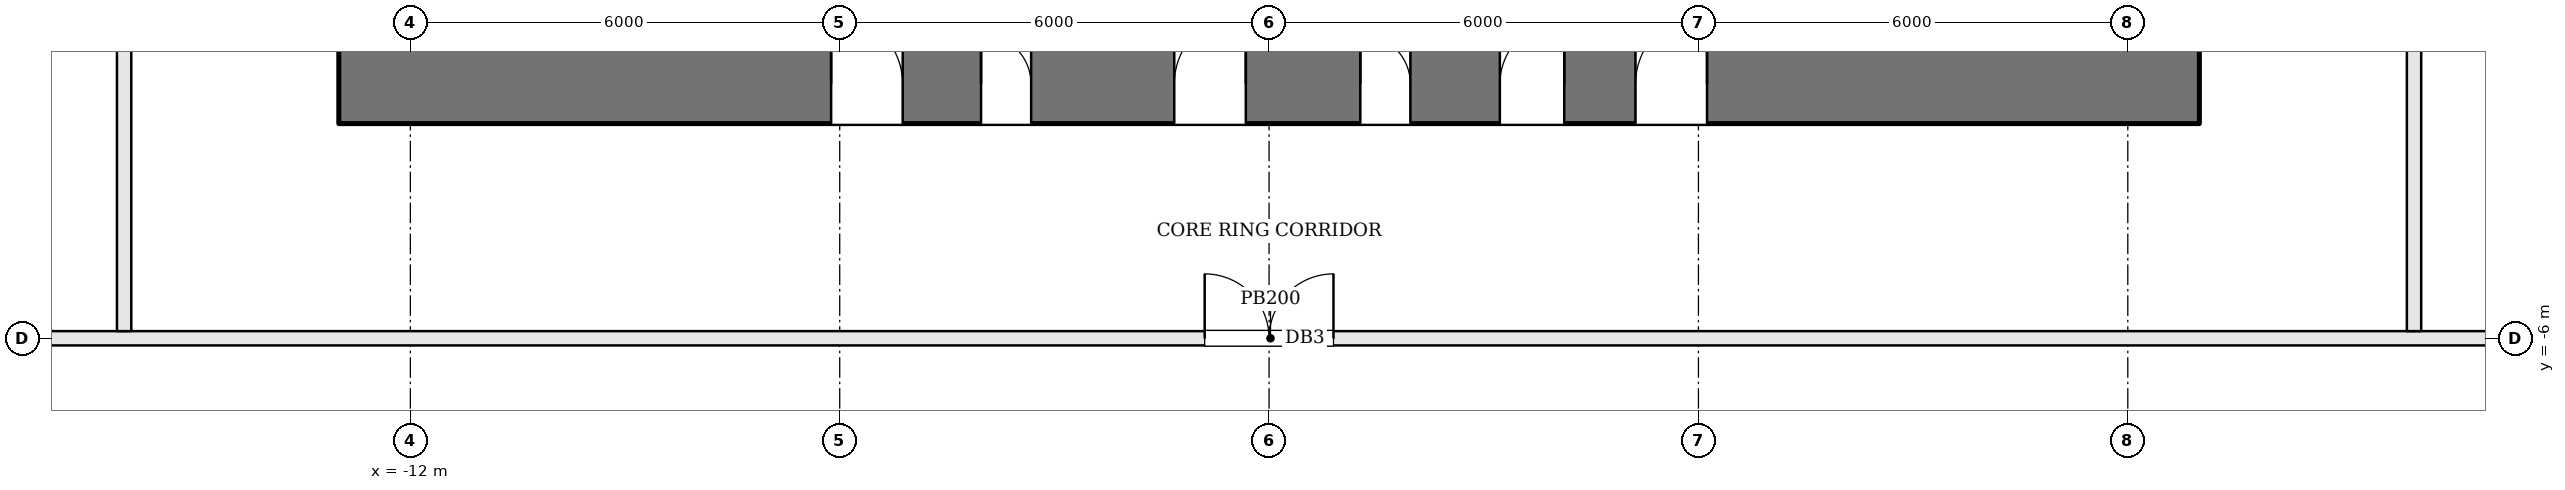
"""IFC4 building model, lengths in metres.
Left out: names, types, materials, properties, quantities, classifications, styles, units other than length and angle.
Written with IfcOpenShell. Run it as: python <this file> out.ifc"""

import sys

from ifc_helpers import new_model, si_unit, direction, frame, frame_2d, origin, place, context, subcontext, project, spatial, rectangle, extrude, element, fill, save


model = new_model("IFC4")
c1 = context("Model", 3, precision=1e-05, world=origin(), true_north=direction((0.0, 1.0)))
c2 = subcontext(c1, "Body", "Model", "MODEL_VIEW")
j1 = project(units=[si_unit("LENGTHUNIT", "METRE"), si_unit("PLANEANGLEUNIT", "RADIAN")], contexts=[c1])
p1 = place(None, origin())
s1 = spatial("IfcSite", under=j1, at=p1, CompositionType="ELEMENT")
p2 = place(p1, origin())
s2 = spatial("IfcBuilding", under=s1, at=p2, CompositionType="ELEMENT")
p3 = place(p2, frame((0.0, 0.0, 106.8)))
s3 = spatial("IfcBuildingStorey", under=s2, at=p3, CompositionType="ELEMENT", Elevation=106.8)
p4 = place(p3, frame((-13.0, -2.45, 0.0), z_axis=(0.0, 0.0, 1.0), x_axis=(1.0, 0.0, 0.0)))
e1 = element("IfcWall", 1, at=p4, inside=s3, PredefinedType="SHEAR", context=c2, shape_type="SweptSolid", body=[
    extrude(rectangle(XDim=26.0, YDim=1.1, at=frame_2d((13.0, 0.0))), origin(), (0.0, 0.0, 1.0), 3.6),
])
p5 = place(p4, frame((8.975, 0.0, 0.0)))
e2 = element("IfcOpeningElement", 2, at=p5, cuts=e1, PredefinedType="OPENING", context=c2, shape_type="SweptSolid", body=[
    extrude(rectangle(XDim=0.7, YDim=2.1, at=frame_2d((0.35, 1.05))), frame((0.0, 0.56, 0.0), z_axis=(0.0, -1.0, 0.0), x_axis=(1.0, 0.0, 0.0)), (0.0, 0.0, 1.0), 1.12),
])
p6 = place(p4, frame((11.675, 0.0, 0.0)))
e3 = element("IfcOpeningElement", 3, at=p6, cuts=e1, PredefinedType="OPENING", context=c2, shape_type="SweptSolid", body=[
    extrude(rectangle(XDim=1.0, YDim=2.1, at=frame_2d((0.5, 1.05))), frame((0.0, 0.56, 0.0), z_axis=(0.0, -1.0, 0.0), x_axis=(1.0, 0.0, 0.0)), (0.0, 0.0, 1.0), 1.12),
])
p7 = place(p4, frame((14.275, 0.0, 0.0)))
e4 = element("IfcOpeningElement", 4, at=p7, cuts=e1, PredefinedType="OPENING", context=c2, shape_type="SweptSolid", body=[
    extrude(rectangle(XDim=0.7, YDim=2.1, at=frame_2d((0.35, 1.05))), frame((0.0, 0.56, 0.0), z_axis=(0.0, -1.0, 0.0), x_axis=(1.0, 0.0, 0.0)), (0.0, 0.0, 1.0), 1.12),
])
p8 = place(p4, frame((16.225, 0.0, 0.0)))
e5 = element("IfcOpeningElement", 5, at=p8, cuts=e1, PredefinedType="OPENING", context=c2, shape_type="SweptSolid", body=[
    extrude(rectangle(XDim=0.9, YDim=2.1, at=frame_2d((0.45, 1.05))), frame((0.0, 0.56, 0.0), z_axis=(0.0, -1.0, 0.0), x_axis=(1.0, 0.0, 0.0)), (0.0, 0.0, 1.0), 1.12),
])
p9 = place(p4, frame((6.88, 0.0, 0.0)))
e6 = element("IfcOpeningElement", 6, at=p9, cuts=e1, PredefinedType="OPENING", context=c2, shape_type="SweptSolid", body=[
    extrude(rectangle(XDim=1.0, YDim=2.1, at=frame_2d((0.5, 1.05))), frame((0.0, 0.56, 0.0), z_axis=(0.0, -1.0, 0.0), x_axis=(1.0, 0.0, 0.0)), (0.0, 0.0, 1.0), 1.12),
])
p10 = place(p4, frame((18.12, 0.0, 0.0)))
e7 = element("IfcOpeningElement", 7, at=p10, cuts=e1, PredefinedType="OPENING", context=c2, shape_type="SweptSolid", body=[
    extrude(rectangle(XDim=1.0, YDim=2.1, at=frame_2d((0.5, 1.05))), frame((0.0, 0.56, 0.0), z_axis=(0.0, -1.0, 0.0), x_axis=(1.0, 0.0, 0.0)), (0.0, 0.0, 1.0), 1.12),
])
p11 = place(p3, frame((-21.998, -6.0, 0.0), z_axis=(0.0, 0.0, 1.0), x_axis=(1.0, 0.0, 0.0)))
e8 = element("IfcWall", 8, at=p11, inside=s3, PredefinedType="PARTITIONING", context=c2, shape_type="SweptSolid", body=[
    extrude(rectangle(XDim=44.036, YDim=0.2, at=frame_2d((22.018, 0.0))), origin(), (0.0, 0.0, 1.0), 3.4),
])
p12 = place(p11, frame((21.098, 0.0, 0.0)))
e9 = element("IfcOpeningElement", 9, at=p12, cuts=e8, PredefinedType="OPENING", context=c2, shape_type="SweptSolid", body=[
    extrude(rectangle(XDim=1.8, YDim=2.1, at=frame_2d((0.9, 1.05))), frame((0.0, 0.11, 0.0), z_axis=(0.0, -1.0, 0.0), x_axis=(1.0, 0.0, 0.0)), (0.0, 0.0, 1.0), 0.22),
])
p13 = place(p3, frame((-16.0, 13.047, 0.0), z_axis=(0.0, 0.0, 1.0), x_axis=(0.0, -1.0, 0.0)))
e10 = element("IfcWall", 10, at=p13, inside=s3, PredefinedType="PARTITIONING", context=c2, shape_type="SweptSolid", body=[
    extrude(rectangle(XDim=18.947, YDim=0.2, at=frame_2d((9.474, 0.0))), origin(), (0.0, 0.0, 1.0), 3.4),
])
p14 = place(p13, frame((7.647, 0.0, 0.0)))
e11 = element("IfcOpeningElement", 11, at=p14, cuts=e10, PredefinedType="OPENING", context=c2, shape_type="SweptSolid", body=[
    extrude(rectangle(XDim=1.8, YDim=2.1, at=frame_2d((0.9, 1.05))), frame((0.0, 0.11, 0.0), z_axis=(0.0, -1.0, 0.0), x_axis=(1.0, 0.0, 0.0)), (0.0, 0.0, 1.0), 0.22),
])
p15 = place(p3, frame((16.0, -5.9, 0.0), z_axis=(0.0, 0.0, 1.0), x_axis=(0.0, 1.0, 0.0)))
e12 = element("IfcWall", 12, at=p15, inside=s3, PredefinedType="PARTITIONING", context=c2, shape_type="SweptSolid", body=[
    extrude(rectangle(XDim=18.952, YDim=0.2, at=frame_2d((9.476, 0.0))), origin(), (0.0, 0.0, 1.0), 3.4),
])
p16 = place(p15, frame((9.5, 0.0, 0.0)))
e13 = element("IfcOpeningElement", 13, at=p16, cuts=e12, PredefinedType="OPENING", context=c2, shape_type="SweptSolid", body=[
    extrude(rectangle(XDim=1.8, YDim=2.1, at=frame_2d((0.9, 1.05))), frame((0.0, 0.11, 0.0), z_axis=(0.0, -1.0, 0.0), x_axis=(1.0, 0.0, 0.0)), (0.0, 0.0, 1.0), 0.22),
])
p17 = place(p5, origin())
e14 = element("IfcDoor", 14, at=p17, inside=s3, OperationType="SINGLE_SWING_LEFT", PredefinedType="DOOR", context=c2, shape_type="SweptSolid", body=[
    extrude(rectangle(XDim=0.7, YDim=2.1, at=frame_2d((0.35, 1.05))), frame((0.0, 0.025, 0.0), z_axis=(0.0, -1.0, 0.0), x_axis=(1.0, 0.0, 0.0)), (0.0, 0.0, 1.0), 0.05),
])
fill(e2, e14)
p18 = place(p6, origin())
e15 = element("IfcDoor", 15, at=p18, inside=s3, OperationType="SINGLE_SWING_RIGHT", PredefinedType="DOOR", context=c2, shape_type="SweptSolid", body=[
    extrude(rectangle(XDim=1.0, YDim=2.1, at=frame_2d((0.5, 1.05))), frame((0.0, 0.025, 0.0), z_axis=(0.0, -1.0, 0.0), x_axis=(1.0, 0.0, 0.0)), (0.0, 0.0, 1.0), 0.05),
])
fill(e3, e15)
p19 = place(p7, origin())
e16 = element("IfcDoor", 16, at=p19, inside=s3, OperationType="SINGLE_SWING_LEFT", PredefinedType="DOOR", context=c2, shape_type="SweptSolid", body=[
    extrude(rectangle(XDim=0.7, YDim=2.1, at=frame_2d((0.35, 1.05))), frame((0.0, 0.025, 0.0), z_axis=(0.0, -1.0, 0.0), x_axis=(1.0, 0.0, 0.0)), (0.0, 0.0, 1.0), 0.05),
])
fill(e4, e16)
p20 = place(p8, origin())
e17 = element("IfcDoor", 17, at=p20, inside=s3, OperationType="SINGLE_SWING_RIGHT", PredefinedType="DOOR", context=c2, shape_type="SweptSolid", body=[
    extrude(rectangle(XDim=0.9, YDim=2.1, at=frame_2d((0.45, 1.05))), frame((0.0, 0.025, 0.0), z_axis=(0.0, -1.0, 0.0), x_axis=(1.0, 0.0, 0.0)), (0.0, 0.0, 1.0), 0.05),
])
fill(e5, e17)
p21 = place(p9, origin())
e18 = element("IfcDoor", 18, at=p21, inside=s3, OperationType="SINGLE_SWING_LEFT", PredefinedType="DOOR", context=c2, shape_type="SweptSolid", body=[
    extrude(rectangle(XDim=1.0, YDim=2.1, at=frame_2d((0.5, 1.05))), frame((0.0, 0.025, 0.0), z_axis=(0.0, -1.0, 0.0), x_axis=(1.0, 0.0, 0.0)), (0.0, 0.0, 1.0), 0.05),
])
fill(e6, e18)
p22 = place(p10, origin())
e19 = element("IfcDoor", 19, at=p22, inside=s3, OperationType="SINGLE_SWING_RIGHT", PredefinedType="DOOR", context=c2, shape_type="SweptSolid", body=[
    extrude(rectangle(XDim=1.0, YDim=2.1, at=frame_2d((0.5, 1.05))), frame((0.0, 0.025, 0.0), z_axis=(0.0, -1.0, 0.0), x_axis=(1.0, 0.0, 0.0)), (0.0, 0.0, 1.0), 0.05),
])
fill(e7, e19)
p23 = place(p12, origin())
e20 = element("IfcDoor", 20, at=p23, inside=s3, OperationType="DOUBLE_DOOR_SINGLE_SWING", PredefinedType="DOOR", context=c2, shape_type="SweptSolid", body=[
    extrude(rectangle(XDim=1.8, YDim=2.1, at=frame_2d((0.9, 1.05))), frame((0.0, 0.025, 0.0), z_axis=(0.0, -1.0, 0.0), x_axis=(1.0, 0.0, 0.0)), (0.0, 0.0, 1.0), 0.05),
])
fill(e9, e20)
save(model, sys.argv[1])
